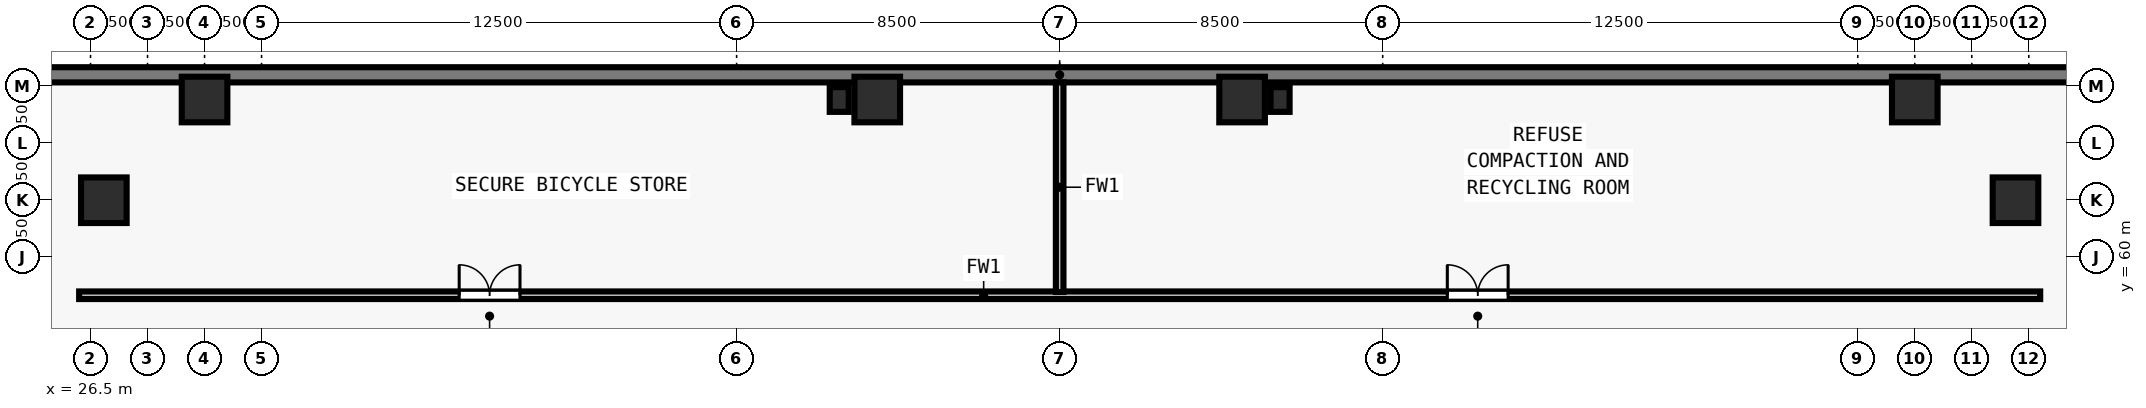
"""IFC4 building model, lengths in metres.
Left out: names, types, materials, properties, quantities, classifications, styles, units other than length and angle.
Written with IfcOpenShell. Run it as: python <this file> out.ifc"""

import sys

from ifc_helpers import new_model, si_unit, direction, frame, frame_2d, origin, origin_2d, place, context, subcontext, project, spatial, rectangle, extrude, element, fill, save


model = new_model("IFC4")
c1 = context("Model", 3, precision=1e-05, world=origin(), true_north=direction((0.0, 1.0)))
c2 = subcontext(c1, "Body", "Model", "MODEL_VIEW")
j1 = project(units=[si_unit("LENGTHUNIT", "METRE"), si_unit("PLANEANGLEUNIT", "RADIAN")], contexts=[c1])
p1 = place(None, origin())
s1 = spatial("IfcSite", under=j1, at=p1, CompositionType="ELEMENT")
p2 = place(p1, origin())
s2 = spatial("IfcBuilding", under=s1, at=p2, CompositionType="ELEMENT")
p3 = place(p2, frame((0.0, 0.0, -4.0)))
s3 = spatial("IfcBuildingStorey", under=s2, at=p3, CompositionType="ELEMENT", Elevation=-4.0)
for number, where, z_axis, x_axis in (
    (1, (77.15, 61.5, 0.0), (0.0, 0.0, 1.0), (1.0, 0.0, 0.0)),
    (2, (74.5, 64.15, 0.0), (0.0, 0.0, 1.0), (1.0, 0.0, 0.0)),
    (3, (56.8, 64.15, 0.0), (0.0, 0.0, 1.0), (1.0, 0.0, 0.0)),
    (4, (47.2, 64.15, 0.0), (0.0, 0.0, 1.0), (1.0, 0.0, 0.0)),
    (5, (29.5, 64.15, 0.0), (0.0, 0.0, 1.0), (1.0, 0.0, 0.0)),
    (6, (26.85, 61.5, 0.0), (0.0, 0.0, 1.0), (1.0, 0.0, 0.0)),
):
    element("IfcColumn", number, at=place(p3, frame(where, z_axis=z_axis, x_axis=x_axis)), inside=s3, PredefinedType="COLUMN", context=c2, shape_type="SweptSolid", body=[
        extrude(rectangle(XDim=1.2, YDim=1.2, at=origin_2d()), origin(), (0.0, 0.0, 1.0), 4.0),
    ])
for number, where, z_axis, x_axis in (
    (7, (46.2, 64.15, 0.0), (0.0, 0.0, 1.0), (1.0, 0.0, 0.0)),
    (8, (57.8, 64.15, 0.0), (0.0, 0.0, 1.0), (1.0, 0.0, 0.0)),
):
    element("IfcColumn", number, at=place(p3, frame(where, z_axis=z_axis, x_axis=x_axis)), inside=s3, PredefinedType="PILASTER", context=c2, shape_type="SweptSolid", body=[
        extrude(rectangle(XDim=0.5, YDim=0.65, at=origin_2d()), origin(), (0.0, 0.0, 1.0), 4.0),
    ])
p4 = place(p3, frame((19.0, 64.8, 0.0), z_axis=(0.0, 0.0, 1.0), x_axis=(1.0, 0.0, 0.0)))
e9 = element("IfcWall", 9, at=p4, inside=s3, PredefinedType="USERDEFINED", context=c2, shape_type="SweptSolid", body=[
    extrude(rectangle(XDim=66.0, YDim=0.4, at=frame_2d((33.0, 0.0))), origin(), (0.0, 0.0, 1.0), 3.7),
])
p5 = place(p3, frame((26.2, 59.0, 0.0), z_axis=(0.0, 0.0, 1.0), x_axis=(1.0, 0.0, 0.0)))
e10 = element("IfcWall", 10, at=p5, inside=s3, PredefinedType="SOLIDWALL", context=c2, shape_type="SweptSolid", body=[
    extrude(rectangle(XDim=51.6, YDim=0.2, at=frame_2d((25.8, 0.0))), origin(), (0.0, 0.0, 1.0), 3.218),
])
p6 = place(p5, frame((10.0, 0.0, 0.0)))
e11 = element("IfcOpeningElement", 11, at=p6, cuts=e10, PredefinedType="OPENING", context=c2, shape_type="SweptSolid", body=[
    extrude(rectangle(XDim=1.6, YDim=2.2, at=frame_2d((0.8, 1.1))), frame((0.0, 0.11, 0.0), z_axis=(0.0, -1.0, 0.0), x_axis=(1.0, 0.0, 0.0)), (0.0, 0.0, 1.0), 0.22),
])
p7 = place(p5, frame((36.0, 0.0, 0.0)))
e12 = element("IfcOpeningElement", 12, at=p7, cuts=e10, PredefinedType="OPENING", context=c2, shape_type="SweptSolid", body=[
    extrude(rectangle(XDim=1.6, YDim=2.2, at=frame_2d((0.8, 1.1))), frame((0.0, 0.11, 0.0), z_axis=(0.0, -1.0, 0.0), x_axis=(1.0, 0.0, 0.0)), (0.0, 0.0, 1.0), 0.22),
])
p8 = place(p3, frame((52.0, 59.085, 0.0), z_axis=(0.0, 0.0, 1.0), x_axis=(0.0, 1.0, 0.0)))
e13 = element("IfcWall", 13, at=p8, inside=s3, PredefinedType="SOLIDWALL", context=c2, shape_type="SweptSolid", body=[
    extrude(rectangle(XDim=5.515, YDim=0.2, at=frame_2d((2.758, 0.0))), origin(), (0.0, 0.0, 1.0), 3.7),
])
p9 = place(p6, origin())
e14 = element("IfcDoor", 14, at=p9, inside=s3, OperationType="DOUBLE_DOOR_SINGLE_SWING", PredefinedType="DOOR", context=c2, shape_type="SweptSolid", body=[
    extrude(rectangle(XDim=1.6, YDim=2.2, at=frame_2d((0.8, 1.1))), frame((0.0, 0.025, 0.0), z_axis=(0.0, -1.0, 0.0), x_axis=(1.0, 0.0, 0.0)), (0.0, 0.0, 1.0), 0.05),
])
fill(e11, e14)
p10 = place(p7, origin())
e15 = element("IfcDoor", 15, at=p10, inside=s3, OperationType="DOUBLE_DOOR_SINGLE_SWING", PredefinedType="DOOR", context=c2, shape_type="SweptSolid", body=[
    extrude(rectangle(XDim=1.6, YDim=2.2, at=frame_2d((0.8, 1.1))), frame((0.0, 0.025, 0.0), z_axis=(0.0, -1.0, 0.0), x_axis=(1.0, 0.0, 0.0)), (0.0, 0.0, 1.0), 0.05),
])
fill(e12, e15)
save(model, sys.argv[1])
